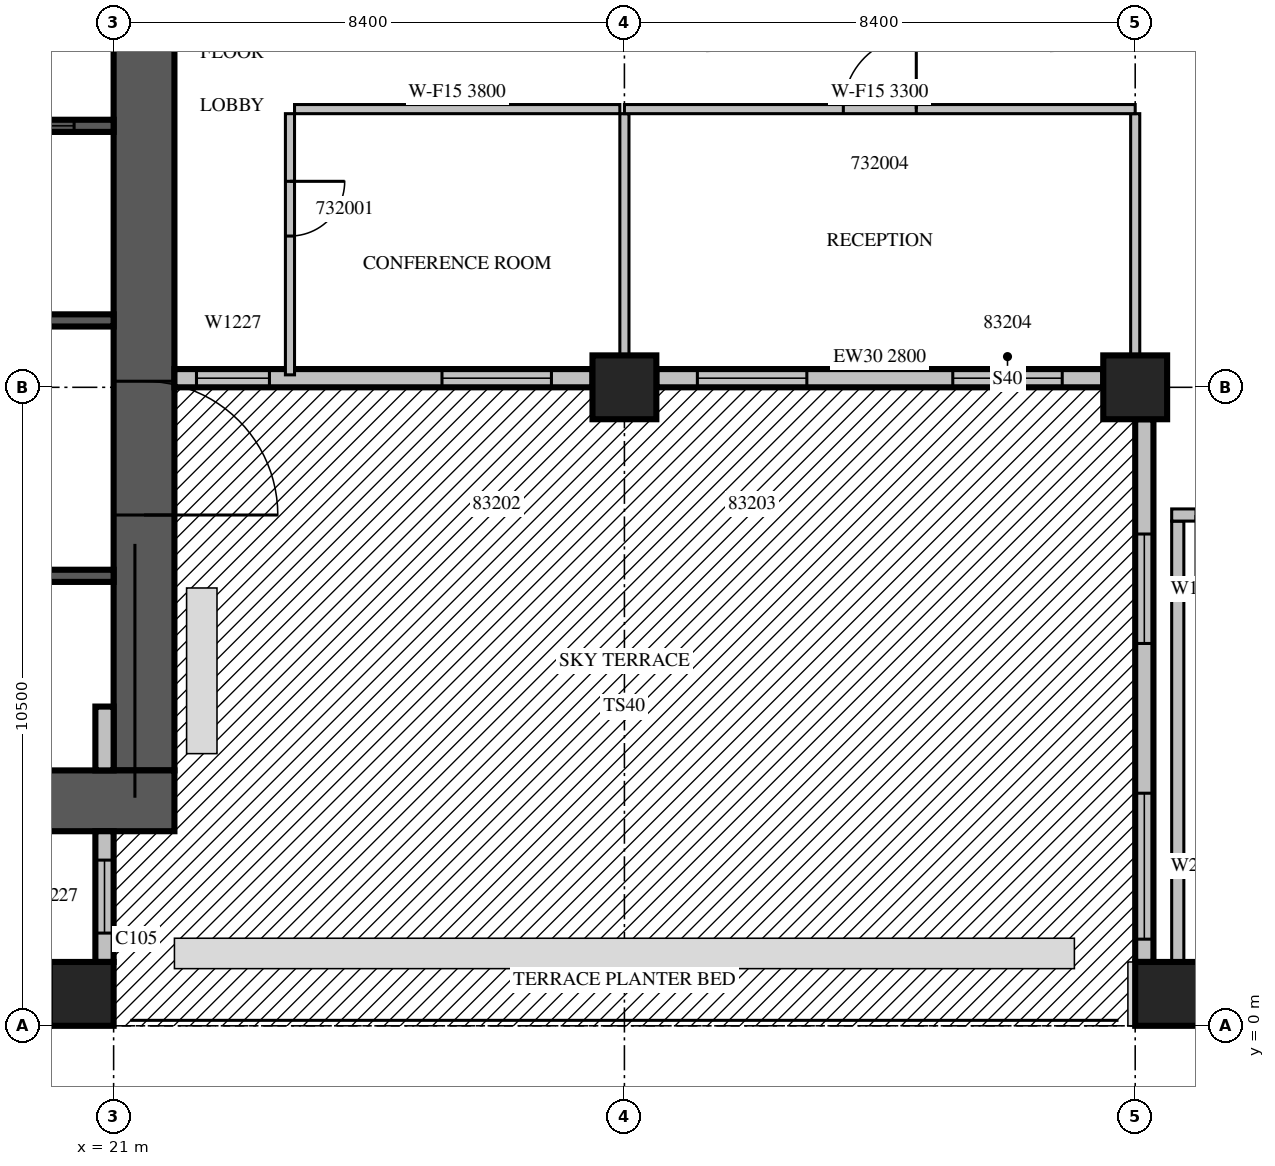
"""IFC4 building model, lengths in metres.
Left out: names, types, materials, properties, quantities, classifications, styles, units other than length and angle.
Written with IfcOpenShell. Run it as: python <this file> out.ifc"""

import sys

from ifc_helpers import new_model, si_unit, direction, frame, frame_2d, origin, origin_2d, place, context, subcontext, project, spatial, rectangle, extrude, source, transform, mapped, element, fill, save


model = new_model("IFC4")
c1 = context("Model", 3, precision=1e-05, world=origin(), true_north=direction((0.0, 1.0)))
c2 = subcontext(c1, "Body", "Model", "MODEL_VIEW")
j1 = project(units=[si_unit("LENGTHUNIT", "METRE"), si_unit("PLANEANGLEUNIT", "RADIAN")], contexts=[c1])
p1 = place(None, origin())
s1 = spatial("IfcSite", under=j1, at=p1, CompositionType="ELEMENT")
p2 = place(p1, origin())
s2 = spatial("IfcBuilding", under=s1, at=p2, CompositionType="ELEMENT")
p3 = place(p2, frame((0.0, 0.0, 145.5)))
s3 = spatial("IfcBuildingStorey", under=s2, at=p3, CompositionType="ELEMENT", Elevation=145.5)
m1 = source(origin(), c2, "Body", "SweptSolid", [
    extrude(rectangle(XDim=1.05, YDim=1.05, at=origin_2d()), origin(), (0.0, 0.0, 1.0), 4.2),
])
for number, where, z_axis, x_axis in (
    (1, (20.475, 0.525, 0.0), (0.0, 0.0, 1.0), (1.0, 0.0, 0.0)),
    (2, (38.325, 0.525, 0.0), (0.0, 0.0, 1.0), (1.0, 0.0, 0.0)),
    (3, (29.4, 10.5, 0.0), (0.0, 0.0, 1.0), (1.0, 0.0, 0.0)),
    (4, (37.8, 10.5, 0.0), (0.0, 0.0, 1.0), (1.0, 0.0, 0.0)),
):
    element("IfcColumn", number, at=place(p3, frame(where, z_axis=z_axis, x_axis=x_axis)), inside=s3, PredefinedType="COLUMN", context=c2, shape_type="MappedRepresentation", body=[
        mapped(m1, transform((0.0, 0.0, 0.0), scale=1.0)),
    ])
m2 = source(origin(), c2, "Body", "SweptSolid", [
    extrude(rectangle(XDim=16.8, YDim=1.0, at=frame_2d((8.4, 0.0))), origin(), (0.0, 0.0, 1.0), 4.2),
])
p4 = place(p3, frame((21.5, 4.2, 0.0), z_axis=(0.0, 0.0, 1.0), x_axis=(0.0, 1.0, 0.0)))
e5 = element("IfcWall", 5, at=p4, inside=s3, PredefinedType="SHEAR", context=c2, shape_type="MappedRepresentation", body=[
    mapped(m2, transform((0.0, 0.0, 0.0), scale=1.0)),
])
m3 = source(origin(), c2, "Body", "SweptSolid", [
    extrude(rectangle(XDim=2.2, YDim=2.1, at=frame_2d((1.1, 1.05))), frame((0.0, 0.51, 0.0), z_axis=(0.0, -1.0, 0.0), x_axis=(1.0, 0.0, 0.0)), (0.0, 0.0, 1.0), 1.02),
])
p5 = place(p4, frame((4.2, 0.0, 0.0)))
e6 = element("IfcOpeningElement", 6, at=p5, cuts=e5, PredefinedType="OPENING", context=c2, shape_type="MappedRepresentation", body=[
    mapped(m3, transform((0.0, 0.0, 0.0), scale=1.0)),
])
m4 = source(origin(), c2, "Body", "SweptSolid", [
    extrude(rectangle(XDim=1.2, YDim=2.1, at=frame_2d((0.6, 1.05))), frame((0.0, 0.51, 0.0), z_axis=(0.0, -1.0, 0.0), x_axis=(1.0, 0.0, 0.0)), (0.0, 0.0, 1.0), 1.02),
])
p6 = place(p4, frame((14.7, 0.0, 0.0)))
e7 = element("IfcOpeningElement", 7, at=p6, cuts=e5, PredefinedType="OPENING", context=c2, shape_type="MappedRepresentation", body=[
    mapped(m4, transform((0.0, 0.0, 0.0), scale=1.0)),
])
m5 = source(origin(), c2, "Body", "SweptSolid", [
    extrude(rectangle(XDim=17.8, YDim=1.0, at=frame_2d((8.9, 0.0))), origin(), (0.0, 0.0, 1.0), 4.2),
])
p7 = place(p3, frame((4.2, 3.7, 0.0), z_axis=(0.0, 0.0, 1.0), x_axis=(1.0, 0.0, 0.0)))
e8 = element("IfcWall", 8, at=p7, inside=s3, PredefinedType="SHEAR", context=c2, shape_type="MappedRepresentation", body=[
    mapped(m5, transform((0.0, 0.0, 0.0), scale=1.0)),
])
m6 = source(origin(), c2, "Body", "SweptSolid", [
    extrude(rectangle(XDim=2.15, YDim=0.3, at=frame_2d((1.075, 0.0))), origin(), (0.0, 0.0, 1.0), 3.8),
])
p8 = place(p3, frame((20.85, 1.05, 0.0), z_axis=(0.0, 0.0, 1.0), x_axis=(0.0, 1.0, 0.0)))
e9 = element("IfcWall", 9, at=p8, inside=s3, PredefinedType="STANDARD", context=c2, shape_type="MappedRepresentation", body=[
    mapped(m6, transform((0.0, 0.0, 0.0), scale=1.0)),
])
m7 = source(origin(), c2, "Body", "SweptSolid", [
    extrude(rectangle(XDim=1.2, YDim=2.7, at=frame_2d((0.6, 1.35))), frame((0.0, 0.16, 0.0), z_axis=(0.0, -1.0, 0.0), x_axis=(1.0, 0.0, 0.0)), (0.0, 0.0, 1.0), 0.32),
])
p9 = place(p8, frame((0.475, 0.0, 0.6)))
e10 = element("IfcOpeningElement", 10, at=p9, cuts=e9, PredefinedType="OPENING", context=c2, shape_type="MappedRepresentation", body=[
    mapped(m7, transform((0.0, 0.0, 0.0), scale=1.0)),
])
m8 = source(origin(), c2, "Body", "SweptSolid", [
    extrude(rectangle(XDim=1.05, YDim=0.3, at=frame_2d((0.525, 0.0))), origin(), (0.0, 0.0, 1.0), 3.8),
])
p10 = place(p3, frame((20.85, 4.2, 0.0), z_axis=(0.0, 0.0, 1.0), x_axis=(0.0, 1.0, 0.0)))
e11 = element("IfcWall", 11, at=p10, inside=s3, PredefinedType="STANDARD", context=c2, shape_type="MappedRepresentation", body=[
    mapped(m8, transform((0.0, 0.0, 0.0), scale=1.0)),
])
m9 = source(origin(), c2, "Body", "SweptSolid", [
    extrude(rectangle(XDim=6.875, YDim=0.3, at=frame_2d((3.438, 0.0))), origin(), (0.0, 0.0, 1.0), 3.8),
])
p11 = place(p3, frame((22.0, 10.65, 0.0), z_axis=(0.0, 0.0, 1.0), x_axis=(1.0, 0.0, 0.0)))
e12 = element("IfcWall", 12, at=p11, inside=s3, PredefinedType="STANDARD", context=c2, shape_type="MappedRepresentation", body=[
    mapped(m9, transform((0.0, 0.0, 0.0), scale=1.0)),
])
p12 = place(p11, frame((0.362, 0.0, 0.6)))
e13 = element("IfcOpeningElement", 13, at=p12, cuts=e12, PredefinedType="OPENING", context=c2, shape_type="MappedRepresentation", body=[
    mapped(m7, transform((0.0, 0.0, 0.0), scale=1.0)),
])
m10 = source(origin(), c2, "Body", "SweptSolid", [
    extrude(rectangle(XDim=1.8, YDim=2.4, at=frame_2d((0.9, 1.2))), frame((0.0, 0.16, 0.0), z_axis=(0.0, -1.0, 0.0), x_axis=(1.0, 0.0, 0.0)), (0.0, 0.0, 1.0), 0.32),
])
p13 = place(p11, frame((4.4, 0.0, 0.0)))
e14 = element("IfcOpeningElement", 14, at=p13, cuts=e12, PredefinedType="OPENING", context=c2, shape_type="MappedRepresentation", body=[
    mapped(m10, transform((0.0, 0.0, 0.0), scale=1.0)),
])
m11 = source(origin(), c2, "Body", "SweptSolid", [
    extrude(rectangle(XDim=7.35, YDim=0.3, at=frame_2d((3.675, 0.0))), origin(), (0.0, 0.0, 1.0), 2.8),
])
p14 = place(p3, frame((29.925, 10.65, 0.0), z_axis=(0.0, 0.0, 1.0), x_axis=(1.0, 0.0, 0.0)))
e15 = element("IfcWall", 15, at=p14, inside=s3, PredefinedType="STANDARD", context=c2, shape_type="MappedRepresentation", body=[
    mapped(m11, transform((0.0, 0.0, 0.0), scale=1.0)),
])
p15 = place(p14, frame((0.675, 0.0, 0.0)))
e16 = element("IfcOpeningElement", 16, at=p15, cuts=e15, PredefinedType="OPENING", context=c2, shape_type="MappedRepresentation", body=[
    mapped(m10, transform((0.0, 0.0, 0.0), scale=1.0)),
])
p16 = place(p14, frame((4.875, 0.0, 0.0)))
e17 = element("IfcOpeningElement", 17, at=p16, cuts=e15, PredefinedType="OPENING", context=c2, shape_type="MappedRepresentation", body=[
    mapped(m10, transform((0.0, 0.0, 0.0), scale=1.0)),
])
m12 = source(origin(), c2, "Body", "SweptSolid", [
    extrude(rectangle(XDim=8.925, YDim=0.3, at=frame_2d((4.463, 0.0))), origin(), (0.0, 0.0, 1.0), 3.8),
])
p17 = place(p3, frame((37.95, 9.975, 0.0), z_axis=(0.0, 0.0, 1.0), x_axis=(0.0, -1.0, 0.0)))
e18 = element("IfcWall", 18, at=p17, inside=s3, PredefinedType="STANDARD", context=c2, shape_type="MappedRepresentation", body=[
    mapped(m12, transform((0.0, 0.0, 0.0), scale=1.0)),
])
m13 = source(origin(), c2, "Body", "SweptSolid", [
    extrude(rectangle(XDim=1.8, YDim=2.7, at=frame_2d((0.9, 1.35))), frame((0.0, 0.16, 0.0), z_axis=(0.0, -1.0, 0.0), x_axis=(1.0, 0.0, 0.0)), (0.0, 0.0, 1.0), 0.32),
])
p18 = place(p17, frame((1.887, 0.0, 0.6)))
e19 = element("IfcOpeningElement", 19, at=p18, cuts=e18, PredefinedType="OPENING", context=c2, shape_type="MappedRepresentation", body=[
    mapped(m13, transform((0.0, 0.0, 0.0), scale=1.0)),
])
m14 = source(origin(), c2, "Body", "SweptSolid", [
    extrude(rectangle(XDim=2.4, YDim=2.7, at=frame_2d((1.2, 1.35))), frame((0.0, 0.16, 0.0), z_axis=(0.0, -1.0, 0.0), x_axis=(1.0, 0.0, 0.0)), (0.0, 0.0, 1.0), 0.32),
])
p19 = place(p17, frame((6.15, 0.0, 0.6)))
e20 = element("IfcOpeningElement", 20, at=p19, cuts=e18, PredefinedType="OPENING", context=c2, shape_type="MappedRepresentation", body=[
    mapped(m14, transform((0.0, 0.0, 0.0), scale=1.0)),
])
m15 = source(origin(), c2, "Body", "SweptSolid", [
    extrude(rectangle(XDim=16.8, YDim=0.2, at=frame_2d((8.4, 0.0))), origin(), (0.0, 0.0, 1.0), 4.2),
])
p20 = place(p3, frame((4.2, 7.4, 0.0), z_axis=(0.0, 0.0, 1.0), x_axis=(1.0, 0.0, 0.0)))
e21 = element("IfcWall", 21, at=p20, inside=s3, PredefinedType="SOLIDWALL", context=c2, shape_type="MappedRepresentation", body=[
    mapped(m15, transform((0.0, 0.0, 0.0), scale=1.0)),
])
m16 = source(origin(), c2, "Body", "SweptSolid", [
    extrude(rectangle(XDim=1.1, YDim=2.1, at=frame_2d((0.55, 1.05))), frame((0.0, 0.11, 0.0), z_axis=(0.0, -1.0, 0.0), x_axis=(1.0, 0.0, 0.0)), (0.0, 0.0, 1.0), 0.22),
])
p21 = place(p20, frame((0.65, 0.0, 0.0)))
e22 = element("IfcOpeningElement", 22, at=p21, cuts=e21, PredefinedType="OPENING", context=c2, shape_type="MappedRepresentation", body=[
    mapped(m16, transform((0.0, 0.0, 0.0), scale=1.0)),
])
p22 = place(p20, frame((3.05, 0.0, 0.0)))
e23 = element("IfcOpeningElement", 23, at=p22, cuts=e21, PredefinedType="OPENING", context=c2, shape_type="MappedRepresentation", body=[
    mapped(m16, transform((0.0, 0.0, 0.0), scale=1.0)),
])
p23 = place(p20, frame((5.45, 0.0, 0.0)))
e24 = element("IfcOpeningElement", 24, at=p23, cuts=e21, PredefinedType="OPENING", context=c2, shape_type="MappedRepresentation", body=[
    mapped(m16, transform((0.0, 0.0, 0.0), scale=1.0)),
])
p24 = place(p20, frame((7.85, 0.0, 0.0)))
e25 = element("IfcOpeningElement", 25, at=p24, cuts=e21, PredefinedType="OPENING", context=c2, shape_type="MappedRepresentation", body=[
    mapped(m16, transform((0.0, 0.0, 0.0), scale=1.0)),
])
p25 = place(p3, frame((4.2, 11.6, 0.0), z_axis=(0.0, 0.0, 1.0), x_axis=(1.0, 0.0, 0.0)))
e26 = element("IfcWall", 26, at=p25, inside=s3, PredefinedType="SOLIDWALL", context=c2, shape_type="MappedRepresentation", body=[
    mapped(m15, transform((0.0, 0.0, 0.0), scale=1.0)),
])
p26 = place(p25, frame((0.65, 0.0, 0.0)))
e27 = element("IfcOpeningElement", 27, at=p26, cuts=e26, PredefinedType="OPENING", context=c2, shape_type="MappedRepresentation", body=[
    mapped(m16, transform((0.0, 0.0, 0.0), scale=1.0)),
])
p27 = place(p25, frame((3.05, 0.0, 0.0)))
e28 = element("IfcOpeningElement", 28, at=p27, cuts=e26, PredefinedType="OPENING", context=c2, shape_type="MappedRepresentation", body=[
    mapped(m16, transform((0.0, 0.0, 0.0), scale=1.0)),
])
p28 = place(p25, frame((5.45, 0.0, 0.0)))
e29 = element("IfcOpeningElement", 29, at=p28, cuts=e26, PredefinedType="OPENING", context=c2, shape_type="MappedRepresentation", body=[
    mapped(m16, transform((0.0, 0.0, 0.0), scale=1.0)),
])
p29 = place(p3, frame((4.2, 14.8, 0.0), z_axis=(0.0, 0.0, 1.0), x_axis=(1.0, 0.0, 0.0)))
e30 = element("IfcWall", 30, at=p29, inside=s3, PredefinedType="SOLIDWALL", context=c2, shape_type="MappedRepresentation", body=[
    mapped(m15, transform((0.0, 0.0, 0.0), scale=1.0)),
])
p30 = place(p29, frame((10.25, 0.0, 0.0)))
e31 = element("IfcOpeningElement", 31, at=p30, cuts=e30, PredefinedType="OPENING", context=c2, shape_type="MappedRepresentation", body=[
    mapped(m16, transform((0.0, 0.0, 0.0), scale=1.0)),
])
p31 = place(p29, frame((12.65, 0.0, 0.0)))
e32 = element("IfcOpeningElement", 32, at=p31, cuts=e30, PredefinedType="OPENING", context=c2, shape_type="MappedRepresentation", body=[
    mapped(m16, transform((0.0, 0.0, 0.0), scale=1.0)),
])
p32 = place(p29, frame((15.05, 0.0, 0.0)))
e33 = element("IfcOpeningElement", 33, at=p32, cuts=e30, PredefinedType="OPENING", context=c2, shape_type="MappedRepresentation", body=[
    mapped(m16, transform((0.0, 0.0, 0.0), scale=1.0)),
])
m17 = source(origin(), c2, "Body", "SweptSolid", [
    extrude(rectangle(XDim=8.0, YDim=0.2, at=frame_2d((4.0, 0.0))), origin(), (0.0, 0.0, 1.0), 3.8),
])
p33 = place(p3, frame((38.5, 0.3, 0.0), z_axis=(0.0, 0.0, 1.0), x_axis=(0.0, 1.0, 0.0)))
e34 = element("IfcWall", 34, at=p33, inside=s3, PredefinedType="PARTITIONING", context=c2, shape_type="MappedRepresentation", body=[
    mapped(m17, transform((0.0, 0.0, 0.0), scale=1.0)),
])
m18 = source(origin(), c2, "Body", "SweptSolid", [
    extrude(rectangle(XDim=5.45, YDim=0.2, at=frame_2d((2.725, 0.0))), origin(), (0.0, 0.0, 1.0), 3.8),
])
p34 = place(p3, frame((38.4, 8.4, 0.0), z_axis=(0.0, 0.0, 1.0), x_axis=(1.0, 0.0, 0.0)))
e35 = element("IfcWall", 35, at=p34, inside=s3, PredefinedType="PARTITIONING", context=c2, shape_type="MappedRepresentation", body=[
    mapped(m18, transform((0.0, 0.0, 0.0), scale=1.0)),
])
m19 = source(origin(), c2, "Body", "SweptSolid", [
    extrude(rectangle(XDim=1.2, YDim=2.1, at=frame_2d((0.6, 1.05))), frame((0.0, 0.11, 0.0), z_axis=(0.0, -1.0, 0.0), x_axis=(1.0, 0.0, 0.0)), (0.0, 0.0, 1.0), 0.22),
])
p35 = place(p34, frame((0.4, 0.0, 0.0)))
e36 = element("IfcOpeningElement", 36, at=p35, cuts=e35, PredefinedType="OPENING", context=c2, shape_type="MappedRepresentation", body=[
    mapped(m19, transform((0.0, 0.0, 0.0), scale=1.0)),
])
m20 = source(origin(), c2, "Body", "SweptSolid", [
    extrude(rectangle(XDim=0.9, YDim=2.1, at=frame_2d((0.45, 1.05))), frame((0.0, 0.11, 0.0), z_axis=(0.0, -1.0, 0.0), x_axis=(1.0, 0.0, 0.0)), (0.0, 0.0, 1.0), 0.22),
])
p36 = place(p34, frame((3.25, 0.0, 0.0)))
e37 = element("IfcOpeningElement", 37, at=p36, cuts=e35, PredefinedType="OPENING", context=c2, shape_type="MappedRepresentation", body=[
    mapped(m20, transform((0.0, 0.0, 0.0), scale=1.0)),
])
m21 = source(origin(), c2, "Body", "SweptSolid", [
    extrude(rectangle(XDim=4.295, YDim=0.15, at=frame_2d((2.147, 0.0))), origin(), (0.0, 0.0, 1.0), 3.8),
])
p37 = place(p3, frame((23.9, 15.0, 0.0), z_axis=(0.0, 0.0, 1.0), x_axis=(0.0, -1.0, 0.0)))
e38 = element("IfcWall", 38, at=p37, inside=s3, PredefinedType="PARTITIONING", context=c2, shape_type="MappedRepresentation", body=[
    mapped(m21, transform((0.0, 0.0, 0.0), scale=1.0)),
])
m22 = source(origin(), c2, "Body", "SweptSolid", [
    extrude(rectangle(XDim=0.9, YDim=2.1, at=frame_2d((0.45, 1.05))), frame((0.0, 0.085, 0.0), z_axis=(0.0, -1.0, 0.0), x_axis=(1.0, 0.0, 0.0)), (0.0, 0.0, 1.0), 0.17),
])
p38 = place(p37, frame((1.113, 0.0, 0.0)))
e39 = element("IfcOpeningElement", 39, at=p38, cuts=e38, PredefinedType="OPENING", context=c2, shape_type="MappedRepresentation", body=[
    mapped(m22, transform((0.0, 0.0, 0.0), scale=1.0)),
])
m23 = source(origin(), c2, "Body", "SweptSolid", [
    extrude(rectangle(XDim=5.35, YDim=0.15, at=frame_2d((2.675, 0.0))), origin(), (0.0, 0.0, 1.0), 3.8),
])
p39 = place(p3, frame((29.325, 15.075, 0.0), z_axis=(0.0, 0.0, 1.0), x_axis=(-1.0, 0.0, 0.0)))
e40 = element("IfcWall", 40, at=p39, inside=s3, PredefinedType="PARTITIONING", context=c2, shape_type="MappedRepresentation", body=[
    mapped(m23, transform((0.0, 0.0, 0.0), scale=1.0)),
])
m24 = source(origin(), c2, "Body", "SweptSolid", [
    extrude(rectangle(XDim=3.976, YDim=0.15, at=frame_2d((1.988, 0.0))), origin(), (0.0, 0.0, 1.0), 3.8),
])
for number, where, z_axis, x_axis in (
    (41, (29.4, 11.024, 0.0), (0.0, 0.0, 1.0), (0.0, 1.0, 0.0)),
    (42, (37.8, 11.024, 0.0), (0.0, 0.0, 1.0), (0.0, 1.0, 0.0)),
):
    element("IfcWall", number, at=place(p3, frame(where, z_axis=z_axis, x_axis=x_axis)), inside=s3, PredefinedType="PARTITIONING", context=c2, shape_type="MappedRepresentation", body=[
        mapped(m24, transform((0.0, 0.0, 0.0), scale=1.0)),
    ])
m25 = source(origin(), c2, "Body", "SweptSolid", [
    extrude(rectangle(XDim=8.4, YDim=0.15, at=frame_2d((4.2, 0.0))), origin(), (0.0, 0.0, 1.0), 3.3),
])
p40 = place(p3, frame((37.8, 15.075, 0.0), z_axis=(0.0, 0.0, 1.0), x_axis=(-1.0, 0.0, 0.0)))
e43 = element("IfcWall", 43, at=p40, inside=s3, PredefinedType="PARTITIONING", context=c2, shape_type="MappedRepresentation", body=[
    mapped(m25, transform((0.0, 0.0, 0.0), scale=1.0)),
])
m26 = source(origin(), c2, "Body", "SweptSolid", [
    extrude(rectangle(XDim=1.2, YDim=2.1, at=frame_2d((0.6, 1.05))), frame((0.0, 0.085, 0.0), z_axis=(0.0, -1.0, 0.0), x_axis=(1.0, 0.0, 0.0)), (0.0, 0.0, 1.0), 0.17),
])
p41 = place(p40, frame((3.6, 0.0, 0.0)))
e44 = element("IfcOpeningElement", 44, at=p41, cuts=e43, PredefinedType="OPENING", context=c2, shape_type="MappedRepresentation", body=[
    mapped(m26, transform((0.0, 0.0, 0.0), scale=1.0)),
])
m27 = source(origin(), c2, "Body", "SweptSolid", [
    extrude(rectangle(XDim=1.2, YDim=2.7, at=frame_2d((0.6, 1.35))), frame((0.0, 0.03, 0.0), z_axis=(0.0, -1.0, 0.0), x_axis=(1.0, 0.0, 0.0)), (0.0, 0.0, 1.0), 0.06),
])
p42 = place(p9, origin())
e45 = element("IfcWindow", 45, at=p42, inside=s3, PartitioningType="SINGLE_PANEL", PredefinedType="WINDOW", context=c2, shape_type="MappedRepresentation", body=[
    mapped(m27, transform((0.0, 0.0, 0.0), scale=1.0)),
])
fill(e10, e45)
p43 = place(p12, origin())
e46 = element("IfcWindow", 46, at=p43, inside=s3, PartitioningType="SINGLE_PANEL", PredefinedType="WINDOW", context=c2, shape_type="MappedRepresentation", body=[
    mapped(m27, transform((0.0, 0.0, 0.0), scale=1.0)),
])
fill(e13, e46)
m28 = source(origin(), c2, "Body", "SweptSolid", [
    extrude(rectangle(XDim=1.8, YDim=2.4, at=frame_2d((0.9, 1.2))), frame((0.0, 0.025, 0.0), z_axis=(0.0, -1.0, 0.0), x_axis=(1.0, 0.0, 0.0)), (0.0, 0.0, 1.0), 0.05),
])
p44 = place(p13, origin())
e47 = element("IfcDoor", 47, at=p44, inside=s3, OperationType="SLIDING_TO_LEFT", PredefinedType="DOOR", context=c2, shape_type="MappedRepresentation", body=[
    mapped(m28, transform((0.0, 0.0, 0.0), scale=1.0)),
])
fill(e14, e47)
p45 = place(p15, origin())
e48 = element("IfcDoor", 48, at=p45, inside=s3, OperationType="SLIDING_TO_LEFT", PredefinedType="DOOR", context=c2, shape_type="MappedRepresentation", body=[
    mapped(m28, transform((0.0, 0.0, 0.0), scale=1.0)),
])
fill(e16, e48)
p46 = place(p16, origin())
e49 = element("IfcDoor", 49, at=p46, inside=s3, OperationType="SLIDING_TO_LEFT", PredefinedType="DOOR", context=c2, shape_type="MappedRepresentation", body=[
    mapped(m28, transform((0.0, 0.0, 0.0), scale=1.0)),
])
fill(e17, e49)
m29 = source(origin(), c2, "Body", "SweptSolid", [
    extrude(rectangle(XDim=1.8, YDim=2.7, at=frame_2d((0.9, 1.35))), frame((0.0, 0.03, 0.0), z_axis=(0.0, -1.0, 0.0), x_axis=(1.0, 0.0, 0.0)), (0.0, 0.0, 1.0), 0.06),
])
p47 = place(p18, origin())
e50 = element("IfcWindow", 50, at=p47, inside=s3, PartitioningType="SINGLE_PANEL", PredefinedType="WINDOW", context=c2, shape_type="MappedRepresentation", body=[
    mapped(m29, transform((0.0, 0.0, 0.0), scale=1.0)),
])
fill(e19, e50)
m30 = source(origin(), c2, "Body", "SweptSolid", [
    extrude(rectangle(XDim=2.4, YDim=2.7, at=frame_2d((1.2, 1.35))), frame((0.0, 0.03, 0.0), z_axis=(0.0, -1.0, 0.0), x_axis=(1.0, 0.0, 0.0)), (0.0, 0.0, 1.0), 0.06),
])
p48 = place(p19, origin())
e51 = element("IfcWindow", 51, at=p48, inside=s3, PartitioningType="SINGLE_PANEL", PredefinedType="WINDOW", context=c2, shape_type="MappedRepresentation", body=[
    mapped(m30, transform((0.0, 0.0, 0.0), scale=1.0)),
])
fill(e20, e51)
m31 = source(origin(), c2, "Body", "SweptSolid", [
    extrude(rectangle(XDim=1.1, YDim=2.1, at=frame_2d((0.55, 1.05))), frame((0.0, 0.025, 0.0), z_axis=(0.0, -1.0, 0.0), x_axis=(1.0, 0.0, 0.0)), (0.0, 0.0, 1.0), 0.05),
])
p49 = place(p32, origin())
e52 = element("IfcDoor", 52, at=p49, inside=s3, OperationType="SLIDING_TO_LEFT", PredefinedType="DOOR", context=c2, shape_type="MappedRepresentation", body=[
    mapped(m31, transform((0.0, 0.0, 0.0), scale=1.0)),
])
fill(e33, e52)
m32 = source(origin(), c2, "Body", "SweptSolid", [
    extrude(rectangle(XDim=2.2, YDim=2.1, at=frame_2d((1.1, 1.05))), frame((0.0, 0.025, 0.0), z_axis=(0.0, -1.0, 0.0), x_axis=(1.0, 0.0, 0.0)), (0.0, 0.0, 1.0), 0.05),
])
p50 = place(p5, origin())
e53 = element("IfcDoor", 53, at=p50, inside=s3, OperationType="DOUBLE_DOOR_SINGLE_SWING", PredefinedType="DOOR", context=c2, shape_type="MappedRepresentation", body=[
    mapped(m32, transform((0.0, 0.0, 0.0), scale=1.0)),
])
fill(e6, e53)
m33 = source(origin(), c2, "Body", "SweptSolid", [
    extrude(rectangle(XDim=0.9, YDim=2.1, at=frame_2d((0.45, 1.05))), frame((0.0, 0.025, 0.0), z_axis=(0.0, -1.0, 0.0), x_axis=(1.0, 0.0, 0.0)), (0.0, 0.0, 1.0), 0.05),
])
p51 = place(p38, origin())
e54 = element("IfcDoor", 54, at=p51, inside=s3, OperationType="SINGLE_SWING_LEFT", PredefinedType="DOOR", context=c2, shape_type="MappedRepresentation", body=[
    mapped(m33, transform((0.0, 0.0, 0.0), scale=1.0)),
])
fill(e39, e54)
m34 = source(origin(), c2, "Body", "SweptSolid", [
    extrude(rectangle(XDim=1.2, YDim=2.1, at=frame_2d((0.6, 1.05))), frame((0.0, 0.025, 0.0), z_axis=(0.0, -1.0, 0.0), x_axis=(1.0, 0.0, 0.0)), (0.0, 0.0, 1.0), 0.05),
])
p52 = place(p41, origin())
e55 = element("IfcDoor", 55, at=p52, inside=s3, OperationType="SINGLE_SWING_RIGHT", PredefinedType="DOOR", context=c2, shape_type="MappedRepresentation", body=[
    mapped(m34, transform((0.0, 0.0, 0.0), scale=1.0)),
])
fill(e44, e55)
save(model, sys.argv[1])
